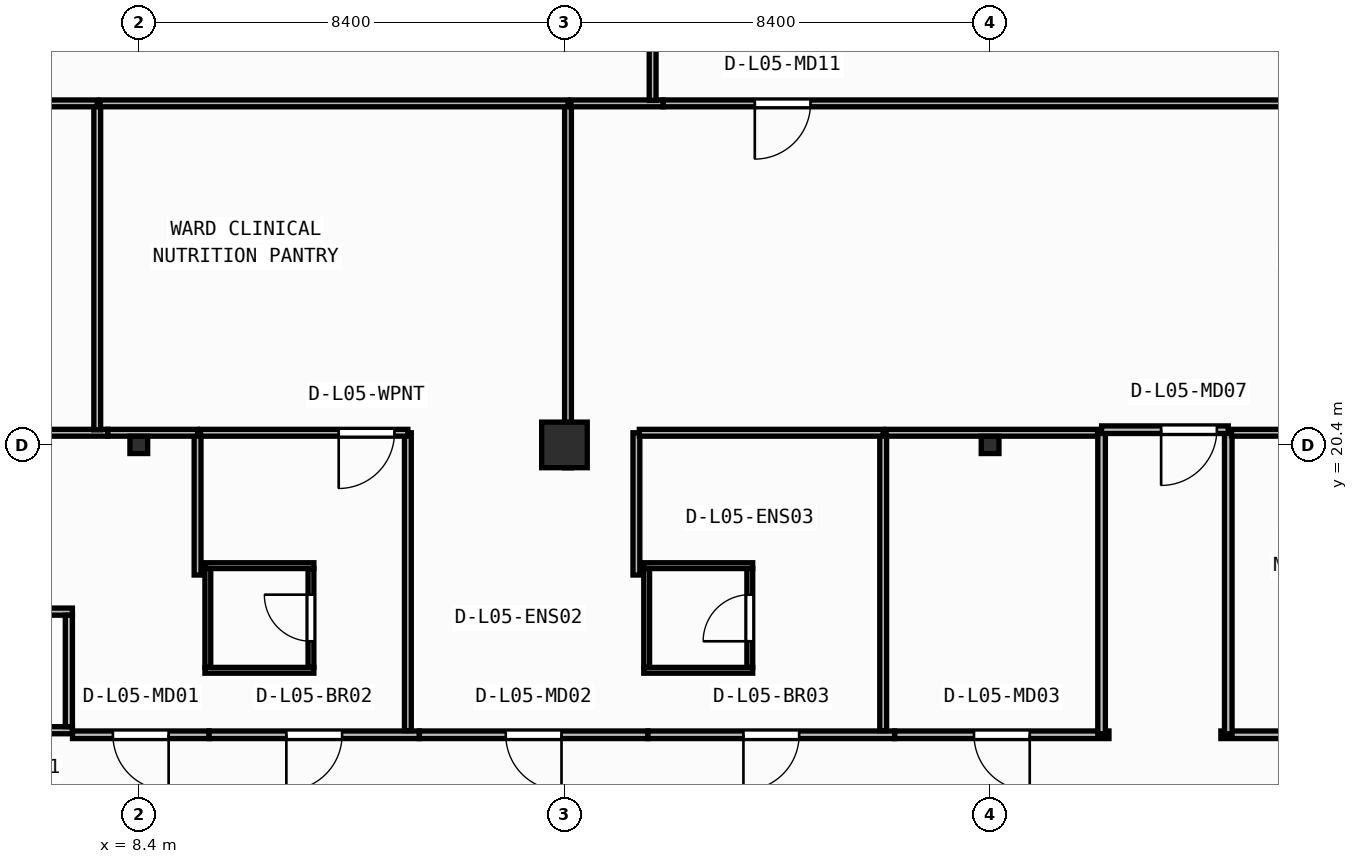
"""IFC4 building model, lengths in metres.
Left out: names, types, materials, properties, quantities, classifications, styles, units other than length and angle.
Written with IfcOpenShell. Run it as: python <this file> out.ifc"""

import sys

from ifc_helpers import new_model, si_unit, direction, frame, frame_2d, origin, origin_2d, place, context, subcontext, project, spatial, rectangle, i_section, extrude, element, fill, save


model = new_model("IFC4")
c1 = context("Model", 3, precision=1e-05, world=origin(), true_north=direction((0.0, 1.0)))
c2 = subcontext(c1, "Body", "Model", "MODEL_VIEW")
j1 = project(units=[si_unit("LENGTHUNIT", "METRE"), si_unit("PLANEANGLEUNIT", "RADIAN")], contexts=[c1])
p1 = place(None, origin())
s1 = spatial("IfcSite", under=j1, at=p1, CompositionType="ELEMENT")
p2 = place(p1, origin())
s2 = spatial("IfcBuilding", under=s1, at=p2, CompositionType="ELEMENT")
p3 = place(p2, frame((0.0, 0.0, 22.5)))
s3 = spatial("IfcBuildingStorey", under=s2, at=p3, CompositionType="ELEMENT", Elevation=22.5)
p4 = place(p3, frame((8.4, 20.4, 0.0), z_axis=(0.0, 0.0, 1.0), x_axis=(1.0, 0.0, 0.0)))
e1 = element("IfcColumn", 1, at=p4, inside=s3, PredefinedType="COLUMN", context=c2, shape_type="SweptSolid", body=[
    extrude(i_section(OverallWidth=0.35, OverallDepth=0.34, WebThickness=0.016, FlangeThickness=0.028, at=origin_2d()), origin(), (0.0, 0.0, 1.0), 3.95),
])
p5 = place(p3, frame((16.8, 20.4, 0.0), z_axis=(0.0, 0.0, 1.0), x_axis=(1.0, 0.0, 0.0)))
e2 = element("IfcColumn", 2, at=p5, inside=s3, PredefinedType="COLUMN", context=c2, shape_type="SweptSolid", body=[
    extrude(rectangle(XDim=0.9, YDim=0.9, at=origin_2d()), origin(), (0.0, 0.0, 1.0), 3.95),
])
p6 = place(p3, frame((25.2, 20.4, 0.0), z_axis=(0.0, 0.0, 1.0), x_axis=(1.0, 0.0, 0.0)))
e3 = element("IfcColumn", 3, at=p6, inside=s3, PredefinedType="COLUMN", context=c2, shape_type="SweptSolid", body=[
    extrude(i_section(OverallWidth=0.35, OverallDepth=0.34, WebThickness=0.016, FlangeThickness=0.028, at=origin_2d()), origin(), (0.0, 0.0, 1.0), 3.95),
])
p7 = place(p3, frame((4.31, 14.77, 0.0), z_axis=(0.0, 0.0, 1.0), x_axis=(1.0, 0.0, 0.0)))
e4 = element("IfcWall", 4, at=p7, inside=s3, PredefinedType="PARTITIONING", context=c2, shape_type="SweptSolid", body=[
    extrude(rectangle(XDim=2.78, YDim=0.14, at=frame_2d((1.39, 0.0))), origin(), (0.0, 0.0, 1.0), 3.71),
])
p8 = place(p7, frame((0.9, 0.0, 0.0)))
e5 = element("IfcOpeningElement", 5, at=p8, cuts=e4, PredefinedType="OPENING", context=c2, shape_type="SweptSolid", body=[
    extrude(rectangle(XDim=0.98, YDim=2.1, at=frame_2d((0.49, 1.05))), frame((0.0, 0.08, 0.0), z_axis=(0.0, -1.0, 0.0), x_axis=(1.0, 0.0, 0.0)), (0.0, 0.0, 1.0), 0.16),
])
p9 = place(p3, frame((4.31, 17.11, 0.0), z_axis=(0.0, 0.0, 1.0), x_axis=(1.0, 0.0, 0.0)))
e6 = element("IfcWall", 6, at=p9, inside=s3, PredefinedType="PARTITIONING", context=c2, shape_type="SweptSolid", body=[
    extrude(rectangle(XDim=2.78, YDim=0.14, at=frame_2d((1.39, 0.0))), origin(), (0.0, 0.0, 1.0), 3.71),
])
p10 = place(p3, frame((7.02, 14.84, 0.0), z_axis=(0.0, 0.0, 1.0), x_axis=(0.0, 1.0, 0.0)))
e7 = element("IfcWall", 7, at=p10, inside=s3, PredefinedType="PARTITIONING", context=c2, shape_type="SweptSolid", body=[
    extrude(rectangle(XDim=2.2, YDim=0.14, at=frame_2d((1.1, 0.0))), origin(), (0.0, 0.0, 1.0), 3.71),
])
for number, where, z_axis, x_axis in (
    (8, (9.705, 15.952, 0.0), (0.0, 0.0, 1.0), (1.0, 0.0, 0.0)),
    (9, (9.705, 18.018, 0.0), (0.0, 0.0, 1.0), (1.0, 0.0, 0.0)),
):
    element("IfcWall", number, at=place(p3, frame(where, z_axis=z_axis, x_axis=x_axis)), inside=s3, PredefinedType="PARTITIONING", context=c2, shape_type="SweptSolid", body=[
        extrude(rectangle(XDim=2.15, YDim=0.115, at=frame_2d((1.075, 0.0))), origin(), (0.0, 0.0, 1.0), 3.71),
    ])
p11 = place(p3, frame((9.762, 16.01, 0.0), z_axis=(0.0, 0.0, 1.0), x_axis=(0.0, 1.0, 0.0)))
e10 = element("IfcWall", 10, at=p11, inside=s3, PredefinedType="PARTITIONING", context=c2, shape_type="SweptSolid", body=[
    extrude(rectangle(XDim=1.95, YDim=0.115, at=frame_2d((0.975, 0.0))), origin(), (0.0, 0.0, 1.0), 3.71),
])
p12 = place(p3, frame((11.798, 16.01, 0.0), z_axis=(0.0, 0.0, 1.0), x_axis=(0.0, 1.0, 0.0)))
e11 = element("IfcWall", 11, at=p12, inside=s3, PredefinedType="PARTITIONING", context=c2, shape_type="SweptSolid", body=[
    extrude(rectangle(XDim=1.95, YDim=0.115, at=frame_2d((0.975, 0.0))), origin(), (0.0, 0.0, 1.0), 3.71),
])
p13 = place(p12, frame((0.515, 0.0, 0.0)))
e12 = element("IfcOpeningElement", 12, at=p13, cuts=e11, PredefinedType="OPENING", context=c2, shape_type="SweptSolid", body=[
    extrude(rectangle(XDim=0.92, YDim=2.1, at=frame_2d((0.46, 1.05))), frame((0.0, 0.067, 0.0), z_axis=(0.0, -1.0, 0.0), x_axis=(1.0, 0.0, 0.0)), (0.0, 0.0, 1.0), 0.135),
])
for number, where, z_axis, x_axis in (
    (13, (18.365, 15.952, 0.0), (0.0, 0.0, 1.0), (1.0, 0.0, 0.0)),
    (14, (18.365, 18.018, 0.0), (0.0, 0.0, 1.0), (1.0, 0.0, 0.0)),
):
    element("IfcWall", number, at=place(p3, frame(where, z_axis=z_axis, x_axis=x_axis)), inside=s3, PredefinedType="PARTITIONING", context=c2, shape_type="SweptSolid", body=[
        extrude(rectangle(XDim=2.15, YDim=0.115, at=frame_2d((1.075, 0.0))), origin(), (0.0, 0.0, 1.0), 3.71),
    ])
p14 = place(p3, frame((18.423, 16.01, 0.0), z_axis=(0.0, 0.0, 1.0), x_axis=(0.0, 1.0, 0.0)))
e15 = element("IfcWall", 15, at=p14, inside=s3, PredefinedType="PARTITIONING", context=c2, shape_type="SweptSolid", body=[
    extrude(rectangle(XDim=1.95, YDim=0.115, at=frame_2d((0.975, 0.0))), origin(), (0.0, 0.0, 1.0), 3.71),
])
p15 = place(p3, frame((20.458, 16.01, 0.0), z_axis=(0.0, 0.0, 1.0), x_axis=(0.0, 1.0, 0.0)))
e16 = element("IfcWall", 16, at=p15, inside=s3, PredefinedType="PARTITIONING", context=c2, shape_type="SweptSolid", body=[
    extrude(rectangle(XDim=1.95, YDim=0.115, at=frame_2d((0.975, 0.0))), origin(), (0.0, 0.0, 1.0), 3.71),
])
p16 = place(p15, frame((0.515, 0.0, 0.0)))
e17 = element("IfcOpeningElement", 17, at=p16, cuts=e16, PredefinedType="OPENING", context=c2, shape_type="SweptSolid", body=[
    extrude(rectangle(XDim=0.92, YDim=2.1, at=frame_2d((0.46, 1.05))), frame((0.0, 0.067, 0.0), z_axis=(0.0, -1.0, 0.0), x_axis=(1.0, 0.0, 0.0)), (0.0, 0.0, 1.0), 0.135),
])
p17 = place(p3, frame((9.786, 14.68, 0.0), z_axis=(0.0, 0.0, 1.0), x_axis=(-1.0, 0.0, 0.0)))
e18 = element("IfcWall", 18, at=p17, inside=s3, PredefinedType="PARTITIONING", context=c2, shape_type="SweptSolid", body=[
    extrude(rectangle(XDim=2.694, YDim=0.15, at=frame_2d((1.347, 0.0))), origin(), (0.0, 0.0, 1.0), 3.71),
])
p18 = place(p17, frame((0.797, 0.0, 0.0)))
e19 = element("IfcOpeningElement", 19, at=p18, cuts=e18, PredefinedType="OPENING", context=c2, shape_type="SweptSolid", body=[
    extrude(rectangle(XDim=1.1, YDim=2.1, at=frame_2d((0.55, 1.05))), frame((0.0, 0.085, 0.0), z_axis=(0.0, -1.0, 0.0), x_axis=(1.0, 0.0, 0.0)), (0.0, 0.0, 1.0), 0.17),
])
p19 = place(p3, frame((13.936, 14.68, 0.0), z_axis=(0.0, 0.0, 1.0), x_axis=(-1.0, 0.0, 0.0)))
e20 = element("IfcWall", 20, at=p19, inside=s3, PredefinedType="PARTITIONING", context=c2, shape_type="SweptSolid", body=[
    extrude(rectangle(XDim=4.148, YDim=0.15, at=frame_2d((2.074, 0.0))), origin(), (0.0, 0.0, 1.0), 3.71),
])
p20 = place(p19, frame((1.524, 0.0, 0.0)))
e21 = element("IfcOpeningElement", 21, at=p20, cuts=e20, PredefinedType="OPENING", context=c2, shape_type="SweptSolid", body=[
    extrude(rectangle(XDim=1.1, YDim=2.1, at=frame_2d((0.55, 1.05))), frame((0.0, 0.085, 0.0), z_axis=(0.0, -1.0, 0.0), x_axis=(1.0, 0.0, 0.0)), (0.0, 0.0, 1.0), 0.17),
])
p21 = place(p3, frame((18.446, 14.68, 0.0), z_axis=(0.0, 0.0, 1.0), x_axis=(-1.0, 0.0, 0.0)))
e22 = element("IfcWall", 22, at=p21, inside=s3, PredefinedType="PARTITIONING", context=c2, shape_type="SweptSolid", body=[
    extrude(rectangle(XDim=4.508, YDim=0.15, at=frame_2d((2.254, 0.0))), origin(), (0.0, 0.0, 1.0), 3.71),
])
p22 = place(p21, frame((1.704, 0.0, 0.0)))
e23 = element("IfcOpeningElement", 23, at=p22, cuts=e22, PredefinedType="OPENING", context=c2, shape_type="SweptSolid", body=[
    extrude(rectangle(XDim=1.1, YDim=2.1, at=frame_2d((0.55, 1.05))), frame((0.0, 0.085, 0.0), z_axis=(0.0, -1.0, 0.0), x_axis=(1.0, 0.0, 0.0)), (0.0, 0.0, 1.0), 0.17),
])
p23 = place(p3, frame((23.316, 14.68, 0.0), z_axis=(0.0, 0.0, 1.0), x_axis=(-1.0, 0.0, 0.0)))
e24 = element("IfcWall", 24, at=p23, inside=s3, PredefinedType="PARTITIONING", context=c2, shape_type="SweptSolid", body=[
    extrude(rectangle(XDim=4.868, YDim=0.15, at=frame_2d((2.434, 0.0))), origin(), (0.0, 0.0, 1.0), 3.71),
])
p24 = place(p23, frame((1.884, 0.0, 0.0)))
e25 = element("IfcOpeningElement", 25, at=p24, cuts=e24, PredefinedType="OPENING", context=c2, shape_type="SweptSolid", body=[
    extrude(rectangle(XDim=1.1, YDim=2.1, at=frame_2d((0.55, 1.05))), frame((0.0, 0.085, 0.0), z_axis=(0.0, -1.0, 0.0), x_axis=(1.0, 0.0, 0.0)), (0.0, 0.0, 1.0), 0.17),
])
p25 = place(p3, frame((27.546, 14.68, 0.0), z_axis=(0.0, 0.0, 1.0), x_axis=(-1.0, 0.0, 0.0)))
e26 = element("IfcWall", 26, at=p25, inside=s3, PredefinedType="PARTITIONING", context=c2, shape_type="SweptSolid", body=[
    extrude(rectangle(XDim=4.228, YDim=0.15, at=frame_2d((2.114, 0.0))), origin(), (0.0, 0.0, 1.0), 3.71),
])
p26 = place(p25, frame((1.564, 0.0, 0.0)))
e27 = element("IfcOpeningElement", 27, at=p26, cuts=e26, PredefinedType="OPENING", context=c2, shape_type="SweptSolid", body=[
    extrude(rectangle(XDim=1.1, YDim=2.1, at=frame_2d((0.55, 1.05))), frame((0.0, 0.085, 0.0), z_axis=(0.0, -1.0, 0.0), x_axis=(1.0, 0.0, 0.0)), (0.0, 0.0, 1.0), 0.17),
])
p27 = place(p3, frame((34.436, 14.68, 0.0), z_axis=(0.0, 0.0, 1.0), x_axis=(-1.0, 0.0, 0.0)))
e28 = element("IfcWall", 28, at=p27, inside=s3, PredefinedType="PARTITIONING", context=c2, shape_type="SweptSolid", body=[
    extrude(rectangle(XDim=4.682, YDim=0.15, at=frame_2d((2.341, 0.0))), origin(), (0.0, 0.0, 1.0), 3.71),
])
p28 = place(p27, frame((1.791, 0.0, 0.0)))
e29 = element("IfcOpeningElement", 29, at=p28, cuts=e28, PredefinedType="OPENING", context=c2, shape_type="SweptSolid", body=[
    extrude(rectangle(XDim=1.1, YDim=2.1, at=frame_2d((0.55, 1.05))), frame((0.0, 0.085, 0.0), z_axis=(0.0, -1.0, 0.0), x_axis=(1.0, 0.0, 0.0)), (0.0, 0.0, 1.0), 0.17),
])
for number, where, z_axis, x_axis in (
    (30, (27.4, 20.7, 0.0), (0.0, 0.0, 1.0), (0.0, -1.0, 0.0)),
    (31, (29.9, 14.7, 0.0), (0.0, 0.0, 1.0), (0.0, 1.0, 0.0)),
):
    element("IfcWall", number, at=place(p3, frame(where, z_axis=z_axis, x_axis=x_axis)), inside=s3, PredefinedType="PARTITIONING", context=c2, shape_type="SweptSolid", body=[
        extrude(rectangle(XDim=6.0, YDim=0.15, at=frame_2d((3.0, 0.0))), origin(), (0.0, 0.0, 1.0), 3.71),
    ])
p29 = place(p3, frame((29.9, 20.7, 0.0), z_axis=(0.0, 0.0, 1.0), x_axis=(-1.0, 0.0, 0.0)))
e32 = element("IfcWall", 32, at=p29, inside=s3, PredefinedType="PARTITIONING", context=c2, shape_type="SweptSolid", body=[
    extrude(rectangle(XDim=2.5, YDim=0.15, at=frame_2d((1.25, 0.0))), origin(), (0.0, 0.0, 1.0), 3.073),
])
p30 = place(p29, frame((0.225, 0.0, 0.0)))
e33 = element("IfcOpeningElement", 33, at=p30, cuts=e32, PredefinedType="OPENING", context=c2, shape_type="SweptSolid", body=[
    extrude(rectangle(XDim=1.1, YDim=2.1, at=frame_2d((0.55, 1.05))), frame((0.0, 0.085, 0.0), z_axis=(0.0, -1.0, 0.0), x_axis=(1.0, 0.0, 0.0)), (0.0, 0.0, 1.0), 0.17),
])
p31 = place(p3, frame((9.56, 17.833, 0.0), z_axis=(0.0, 0.0, 1.0), x_axis=(0.0, 1.0, 0.0)))
e34 = element("IfcWall", 34, at=p31, inside=s3, PredefinedType="PARTITIONING", context=c2, shape_type="SweptSolid", body=[
    extrude(rectangle(XDim=2.807, YDim=0.135, at=frame_2d((1.404, 0.0))), origin(), (0.0, 0.0, 1.0), 3.71),
])
p32 = place(p3, frame((7.788, 20.64, 0.0), z_axis=(0.0, 0.0, 1.0), x_axis=(-1.0, 0.0, 0.0)))
e35 = element("IfcWall", 35, at=p32, inside=s3, PredefinedType="PARTITIONING", context=c2, shape_type="SweptSolid", body=[
    extrude(rectangle(XDim=3.04, YDim=0.135, at=frame_2d((1.52, 0.0))), origin(), (0.0, 0.0, 1.0), 3.073),
])
p33 = place(p3, frame((9.56, 20.64, 0.0), z_axis=(0.0, 0.0, 1.0), x_axis=(-1.0, 0.0, 0.0)))
e36 = element("IfcWall", 36, at=p33, inside=s3, PredefinedType="PARTITIONING", context=c2, shape_type="SweptSolid", body=[
    extrude(rectangle(XDim=1.771, YDim=0.135, at=frame_2d((0.885, 0.0))), origin(), (0.0, 0.0, 1.0), 3.073),
])
p34 = place(p3, frame((13.71, 14.76, 0.0), z_axis=(0.0, 0.0, 1.0), x_axis=(0.0, 1.0, 0.0)))
e37 = element("IfcWall", 37, at=p34, inside=s3, PredefinedType="PARTITIONING", context=c2, shape_type="SweptSolid", body=[
    extrude(rectangle(XDim=5.88, YDim=0.135, at=frame_2d((2.94, 0.0))), origin(), (0.0, 0.0, 1.0), 3.71),
])
p35 = place(p3, frame((13.71, 20.64, 0.0), z_axis=(0.0, 0.0, 1.0), x_axis=(-1.0, 0.0, 0.0)))
e38 = element("IfcWall", 38, at=p35, inside=s3, PredefinedType="PARTITIONING", context=c2, shape_type="SweptSolid", body=[
    extrude(rectangle(XDim=4.093, YDim=0.135, at=frame_2d((2.046, 0.0))), origin(), (0.0, 0.0, 1.0), 3.073),
])
p36 = place(p35, frame((0.265, 0.0, 0.0)))
e39 = element("IfcOpeningElement", 39, at=p36, cuts=e38, PredefinedType="OPENING", context=c2, shape_type="SweptSolid", body=[
    extrude(rectangle(XDim=1.1, YDim=2.1, at=frame_2d((0.55, 1.05))), frame((0.0, 0.077, 0.0), z_axis=(0.0, -1.0, 0.0), x_axis=(1.0, 0.0, 0.0)), (0.0, 0.0, 1.0), 0.155),
])
p37 = place(p3, frame((18.22, 17.833, 0.0), z_axis=(0.0, 0.0, 1.0), x_axis=(0.0, 1.0, 0.0)))
e40 = element("IfcWall", 40, at=p37, inside=s3, PredefinedType="PARTITIONING", context=c2, shape_type="SweptSolid", body=[
    extrude(rectangle(XDim=2.807, YDim=0.135, at=frame_2d((1.404, 0.0))), origin(), (0.0, 0.0, 1.0), 3.71),
])
p38 = place(p3, frame((23.09, 14.76, 0.0), z_axis=(0.0, 0.0, 1.0), x_axis=(0.0, 1.0, 0.0)))
e41 = element("IfcWall", 41, at=p38, inside=s3, PredefinedType="PARTITIONING", context=c2, shape_type="SweptSolid", body=[
    extrude(rectangle(XDim=5.88, YDim=0.135, at=frame_2d((2.94, 0.0))), origin(), (0.0, 0.0, 1.0), 3.71),
])
p39 = place(p3, frame((23.09, 20.64, 0.0), z_axis=(0.0, 0.0, 1.0), x_axis=(-1.0, 0.0, 0.0)))
e42 = element("IfcWall", 42, at=p39, inside=s3, PredefinedType="PARTITIONING", context=c2, shape_type="SweptSolid", body=[
    extrude(rectangle(XDim=4.812, YDim=0.135, at=frame_2d((2.406, 0.0))), origin(), (0.0, 0.0, 1.0), 3.073),
])
p40 = place(p3, frame((27.32, 20.64, 0.0), z_axis=(0.0, 0.0, 1.0), x_axis=(-1.0, 0.0, 0.0)))
e43 = element("IfcWall", 43, at=p40, inside=s3, PredefinedType="PARTITIONING", context=c2, shape_type="SweptSolid", body=[
    extrude(rectangle(XDim=4.173, YDim=0.135, at=frame_2d((2.086, 0.0))), origin(), (0.0, 0.0, 1.0), 3.073),
])
p41 = place(p3, frame((34.21, 20.64, 0.0), z_axis=(0.0, 0.0, 1.0), x_axis=(-1.0, 0.0, 0.0)))
e44 = element("IfcWall", 44, at=p41, inside=s3, PredefinedType="PARTITIONING", context=c2, shape_type="SweptSolid", body=[
    extrude(rectangle(XDim=4.245, YDim=0.135, at=frame_2d((2.123, 0.0))), origin(), (0.0, 0.0, 1.0), 3.073),
])
p42 = place(p3, frame((7.58, 20.698, 0.0), z_axis=(0.0, 0.0, 1.0), x_axis=(0.0, 1.0, 0.0)))
e45 = element("IfcWall", 45, at=p42, inside=s3, PredefinedType="PARTITIONING", context=c2, shape_type="SweptSolid", body=[
    extrude(rectangle(XDim=6.442, YDim=0.135, at=frame_2d((3.221, 0.0))), origin(), (0.0, 0.0, 1.0), 3.71),
])
p43 = place(p3, frame((7.58, 27.14, 0.0), z_axis=(0.0, 0.0, 1.0), x_axis=(-1.0, 0.0, 0.0)))
e46 = element("IfcWall", 46, at=p43, inside=s3, PredefinedType="PARTITIONING", context=c2, shape_type="SweptSolid", body=[
    extrude(rectangle(XDim=7.34, YDim=0.135, at=frame_2d((3.67, 0.0))), origin(), (0.0, 0.0, 1.0), 3.71),
])
p44 = place(p43, frame((2.098, 0.0, 0.0)))
e47 = element("IfcOpeningElement", 47, at=p44, cuts=e46, PredefinedType="OPENING", context=c2, shape_type="SweptSolid", body=[
    extrude(rectangle(XDim=1.1, YDim=2.1, at=frame_2d((0.55, 1.05))), frame((0.0, 0.077, 0.0), z_axis=(0.0, -1.0, 0.0), x_axis=(1.0, 0.0, 0.0)), (0.0, 0.0, 1.0), 0.155),
])
p45 = place(p3, frame((16.87, 19.95, 0.0), z_axis=(0.0, 0.0, 1.0), x_axis=(0.0, 1.0, 0.0)))
e48 = element("IfcWall", 48, at=p45, inside=s3, PredefinedType="PARTITIONING", context=c2, shape_type="SweptSolid", body=[
    extrude(rectangle(XDim=7.19, YDim=0.135, at=frame_2d((3.595, 0.0))), origin(), (0.0, 0.0, 1.0), 3.073),
])
p46 = place(p3, frame((16.87, 27.14, 0.0), z_axis=(0.0, 0.0, 1.0), x_axis=(-1.0, 0.0, 0.0)))
e49 = element("IfcWall", 49, at=p46, inside=s3, PredefinedType="PARTITIONING", context=c2, shape_type="SweptSolid", body=[
    extrude(rectangle(XDim=9.233, YDim=0.135, at=frame_2d((4.616, 0.0))), origin(), (0.0, 0.0, 1.0), 3.71),
])
p47 = place(p3, frame((18.748, 27.14, 0.0), z_axis=(0.0, 0.0, 1.0), x_axis=(-1.0, 0.0, 0.0)))
e50 = element("IfcWall", 50, at=p47, inside=s3, PredefinedType="PARTITIONING", context=c2, shape_type="SweptSolid", body=[
    extrude(rectangle(XDim=1.82, YDim=0.135, at=frame_2d((0.91, 0.0))), origin(), (0.0, 0.0, 1.0), 3.71),
])
p48 = place(p3, frame((36.32, 27.14, 0.0), z_axis=(0.0, 0.0, 1.0), x_axis=(-1.0, 0.0, 0.0)))
e51 = element("IfcWall", 51, at=p48, inside=s3, PredefinedType="PARTITIONING", context=c2, shape_type="SweptSolid", body=[
    extrude(rectangle(XDim=17.571, YDim=0.135, at=frame_2d((8.785, 0.0))), origin(), (0.0, 0.0, 1.0), 3.71),
])
p49 = place(p48, frame((14.663, 0.0, 0.0)))
e52 = element("IfcOpeningElement", 52, at=p49, cuts=e51, PredefinedType="OPENING", context=c2, shape_type="SweptSolid", body=[
    extrude(rectangle(XDim=1.1, YDim=2.1, at=frame_2d((0.55, 1.05))), frame((0.0, 0.077, 0.0), z_axis=(0.0, -1.0, 0.0), x_axis=(1.0, 0.0, 0.0)), (0.0, 0.0, 1.0), 0.155),
])
p50 = place(p3, frame((18.54, 27.198, 0.0), z_axis=(0.0, 0.0, 1.0), x_axis=(0.0, 1.0, 0.0)))
e53 = element("IfcWall", 53, at=p50, inside=s3, PredefinedType="PARTITIONING", context=c2, shape_type="SweptSolid", body=[
    extrude(rectangle(XDim=7.046, YDim=0.135, at=frame_2d((3.523, 0.0))), origin(), (0.0, 0.0, 1.0), 3.71),
])
p51 = place(p13, origin())
e54 = element("IfcDoor", 54, at=p51, inside=s3, OperationType="SINGLE_SWING_RIGHT", PredefinedType="DOOR", context=c2, shape_type="SweptSolid", body=[
    extrude(rectangle(XDim=0.92, YDim=2.1, at=frame_2d((0.46, 1.05))), frame((0.0, 0.025, 0.0), z_axis=(0.0, -1.0, 0.0), x_axis=(1.0, 0.0, 0.0)), (0.0, 0.0, 1.0), 0.05),
])
fill(e12, e54)
p52 = place(p16, origin())
e55 = element("IfcDoor", 55, at=p52, inside=s3, OperationType="SINGLE_SWING_LEFT", PredefinedType="DOOR", context=c2, shape_type="SweptSolid", body=[
    extrude(rectangle(XDim=0.92, YDim=2.1, at=frame_2d((0.46, 1.05))), frame((0.0, 0.025, 0.0), z_axis=(0.0, -1.0, 0.0), x_axis=(1.0, 0.0, 0.0)), (0.0, 0.0, 1.0), 0.05),
])
fill(e17, e55)
p53 = place(p18, origin())
e56 = element("IfcDoor", 56, at=p53, inside=s3, OperationType="SINGLE_SWING_LEFT", PredefinedType="DOOR", context=c2, shape_type="SweptSolid", body=[
    extrude(rectangle(XDim=1.1, YDim=2.1, at=frame_2d((0.55, 1.05))), frame((0.0, 0.025, 0.0), z_axis=(0.0, -1.0, 0.0), x_axis=(1.0, 0.0, 0.0)), (0.0, 0.0, 1.0), 0.05),
])
fill(e19, e56)
p54 = place(p20, origin())
e57 = element("IfcDoor", 57, at=p54, inside=s3, OperationType="SINGLE_SWING_RIGHT", PredefinedType="DOOR", context=c2, shape_type="SweptSolid", body=[
    extrude(rectangle(XDim=1.1, YDim=2.1, at=frame_2d((0.55, 1.05))), frame((0.0, 0.025, 0.0), z_axis=(0.0, -1.0, 0.0), x_axis=(1.0, 0.0, 0.0)), (0.0, 0.0, 1.0), 0.05),
])
fill(e21, e57)
p55 = place(p22, origin())
e58 = element("IfcDoor", 58, at=p55, inside=s3, OperationType="SINGLE_SWING_LEFT", PredefinedType="DOOR", context=c2, shape_type="SweptSolid", body=[
    extrude(rectangle(XDim=1.1, YDim=2.1, at=frame_2d((0.55, 1.05))), frame((0.0, 0.025, 0.0), z_axis=(0.0, -1.0, 0.0), x_axis=(1.0, 0.0, 0.0)), (0.0, 0.0, 1.0), 0.05),
])
fill(e23, e58)
p56 = place(p24, origin())
e59 = element("IfcDoor", 59, at=p56, inside=s3, OperationType="SINGLE_SWING_RIGHT", PredefinedType="DOOR", context=c2, shape_type="SweptSolid", body=[
    extrude(rectangle(XDim=1.1, YDim=2.1, at=frame_2d((0.55, 1.05))), frame((0.0, 0.025, 0.0), z_axis=(0.0, -1.0, 0.0), x_axis=(1.0, 0.0, 0.0)), (0.0, 0.0, 1.0), 0.05),
])
fill(e25, e59)
p57 = place(p26, origin())
e60 = element("IfcDoor", 60, at=p57, inside=s3, OperationType="SINGLE_SWING_LEFT", PredefinedType="DOOR", context=c2, shape_type="SweptSolid", body=[
    extrude(rectangle(XDim=1.1, YDim=2.1, at=frame_2d((0.55, 1.05))), frame((0.0, 0.025, 0.0), z_axis=(0.0, -1.0, 0.0), x_axis=(1.0, 0.0, 0.0)), (0.0, 0.0, 1.0), 0.05),
])
fill(e27, e60)
p58 = place(p30, origin())
e61 = element("IfcDoor", 61, at=p58, inside=s3, OperationType="SINGLE_SWING_RIGHT", PredefinedType="DOOR", context=c2, shape_type="SweptSolid", body=[
    extrude(rectangle(XDim=1.1, YDim=2.1, at=frame_2d((0.55, 1.05))), frame((0.0, 0.025, 0.0), z_axis=(0.0, -1.0, 0.0), x_axis=(1.0, 0.0, 0.0)), (0.0, 0.0, 1.0), 0.05),
])
fill(e33, e61)
p59 = place(p36, origin())
e62 = element("IfcDoor", 62, at=p59, inside=s3, OperationType="SINGLE_SWING_RIGHT", PredefinedType="DOOR", context=c2, shape_type="SweptSolid", body=[
    extrude(rectangle(XDim=1.1, YDim=2.1, at=frame_2d((0.55, 1.05))), frame((0.0, 0.025, 0.0), z_axis=(0.0, -1.0, 0.0), x_axis=(1.0, 0.0, 0.0)), (0.0, 0.0, 1.0), 0.05),
])
fill(e39, e62)
p60 = place(p49, origin())
e63 = element("IfcDoor", 63, at=p60, inside=s3, OperationType="SINGLE_SWING_RIGHT", PredefinedType="DOOR", context=c2, shape_type="SweptSolid", body=[
    extrude(rectangle(XDim=1.1, YDim=2.1, at=frame_2d((0.55, 1.05))), frame((0.0, 0.025, 0.0), z_axis=(0.0, -1.0, 0.0), x_axis=(1.0, 0.0, 0.0)), (0.0, 0.0, 1.0), 0.05),
])
fill(e52, e63)
save(model, sys.argv[1])
